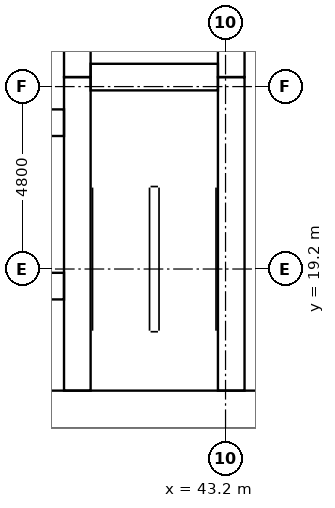
"""IFC4 building model, lengths in metres.
Left out: names, types, materials, properties, quantities, classifications, styles, units other than length and angle.
Written with IfcOpenShell. Run it as: python <this file> out.ifc"""

import sys

from ifc_helpers import new_model, si_unit, direction, frame, frame_2d, origin, place, context, subcontext, project, spatial, rectangle, extrude, element, fill, save


model = new_model("IFC4")
c1 = context("Model", 3, precision=1e-05, world=origin(), true_north=direction((0.0, 1.0)))
c2 = subcontext(c1, "Body", "Model", "MODEL_VIEW")
j1 = project(units=[si_unit("LENGTHUNIT", "METRE"), si_unit("PLANEANGLEUNIT", "RADIAN")], contexts=[c1])
p1 = place(None, origin())
s1 = spatial("IfcSite", under=j1, at=p1, CompositionType="ELEMENT")
p2 = place(p1, origin())
s2 = spatial("IfcBuilding", under=s1, at=p2, CompositionType="ELEMENT")
p3 = place(p2, frame((0.0, 0.0, 10.5)))
s3 = spatial("IfcBuildingStorey", under=s2, at=p3, CompositionType="ELEMENT", Elevation=10.5)
p4 = place(p3, frame((15.0, 15.5, 0.0), z_axis=(0.0, 0.0, 1.0), x_axis=(1.0, 0.0, 0.0)))
e1 = element("IfcWall", 1, at=p4, inside=s3, PredefinedType="SHEAR", context=c2, shape_type="SweptSolid", body=[
    extrude(rectangle(XDim=32.4, YDim=1.0, at=frame_2d((16.2, 0.0))), origin(), (0.0, 0.0, 1.0), 4.2),
])
p5 = place(p4, frame((15.3, 0.0, 0.0)))
e2 = element("IfcOpeningElement", 2, at=p5, cuts=e1, PredefinedType="OPENING", context=c2, shape_type="SweptSolid", body=[
    extrude(rectangle(XDim=1.8, YDim=2.1, at=frame_2d((0.9, 1.05))), frame((0.0, 0.51, 0.0), z_axis=(0.0, -1.0, 0.0), x_axis=(1.0, 0.0, 0.0)), (0.0, 0.0, 1.0), 1.02),
])
p6 = place(p3, frame((39.3, 16.0, 0.0), z_axis=(0.0, 0.0, 1.0), x_axis=(0.0, 1.0, 0.0)))
e3 = element("IfcWall", 3, at=p6, inside=s3, PredefinedType="SHEAR", context=c2, shape_type="SweptSolid", body=[
    extrude(rectangle(XDim=8.25, YDim=0.7, at=frame_2d((4.125, 0.0))), origin(), (0.0, 0.0, 1.0), 4.2),
])
p7 = place(p3, frame((39.3, 24.25, 0.0), z_axis=(0.0, 0.0, 1.0), x_axis=(0.0, 1.0, 0.0)))
e4 = element("IfcWall", 4, at=p7, inside=s3, PredefinedType="SHEAR", context=c2, shape_type="SweptSolid", body=[
    extrude(rectangle(XDim=3.5, YDim=0.7, at=frame_2d((1.75, 0.0))), origin(), (0.0, 0.0, 1.0), 4.2),
])
p8 = place(p3, frame((43.35, 16.0, 0.0), z_axis=(0.0, 0.0, 1.0), x_axis=(0.0, 1.0, 0.0)))
e5 = element("IfcWall", 5, at=p8, inside=s3, PredefinedType="SHEAR", context=c2, shape_type="SweptSolid", body=[
    extrude(rectangle(XDim=8.25, YDim=0.7, at=frame_2d((4.125, 0.0))), origin(), (0.0, 0.0, 1.0), 4.2),
])
p9 = place(p8, frame((0.2, 0.0, 0.0)))
e6 = element("IfcOpeningElement", 6, at=p9, cuts=e5, PredefinedType="OPENING", context=c2, shape_type="SweptSolid", body=[
    extrude(rectangle(XDim=1.2, YDim=2.1, at=frame_2d((0.6, 1.05))), frame((0.0, 0.36, 0.0), z_axis=(0.0, -1.0, 0.0), x_axis=(1.0, 0.0, 0.0)), (0.0, 0.0, 1.0), 0.72),
])
p10 = place(p3, frame((43.35, 24.25, 0.0), z_axis=(0.0, 0.0, 1.0), x_axis=(0.0, 1.0, 0.0)))
e7 = element("IfcWall", 7, at=p10, inside=s3, PredefinedType="SHEAR", context=c2, shape_type="SweptSolid", body=[
    extrude(rectangle(XDim=3.5, YDim=0.7, at=frame_2d((1.75, 0.0))), origin(), (0.0, 0.0, 1.0), 4.2),
])
p11 = place(p10, frame((1.2, 0.0, 0.0)))
e8 = element("IfcOpeningElement", 8, at=p11, cuts=e7, PredefinedType="OPENING", context=c2, shape_type="SweptSolid", body=[
    extrude(rectangle(XDim=1.1, YDim=2.1, at=frame_2d((0.55, 1.05))), frame((0.0, 0.36, 0.0), z_axis=(0.0, -1.0, 0.0), x_axis=(1.0, 0.0, 0.0)), (0.0, 0.0, 1.0), 0.72),
])
p12 = place(p3, frame((39.65, 24.25, 0.0), z_axis=(0.0, 0.0, 1.0), x_axis=(1.0, 0.0, 0.0)))
e9 = element("IfcWall", 9, at=p12, inside=s3, PredefinedType="SHEAR", context=c2, shape_type="SweptSolid", body=[
    extrude(rectangle(XDim=3.35, YDim=0.7, at=frame_2d((1.675, 0.0))), origin(), (0.0, 0.0, 1.0), 4.2),
])
p13 = place(p3, frame((33.35, 18.75, 0.0), z_axis=(0.0, 0.0, 1.0), x_axis=(1.0, 0.0, 0.0)))
e10 = element("IfcWall", 10, at=p13, inside=s3, PredefinedType="SHEAR", context=c2, shape_type="SweptSolid", body=[
    extrude(rectangle(XDim=5.6, YDim=0.7, at=frame_2d((2.8, 0.0))), origin(), (0.0, 0.0, 1.0), 4.2),
])
p14 = place(p13, frame((1.325, 0.0, 0.0)))
e11 = element("IfcOpeningElement", 11, at=p14, cuts=e10, PredefinedType="OPENING", context=c2, shape_type="SweptSolid", body=[
    extrude(rectangle(XDim=1.1, YDim=2.1, at=frame_2d((0.55, 1.05))), frame((0.0, 0.36, 0.0), z_axis=(0.0, -1.0, 0.0), x_axis=(1.0, 0.0, 0.0)), (0.0, 0.0, 1.0), 0.72),
])
p15 = place(p13, frame((3.875, 0.0, 0.0)))
e12 = element("IfcOpeningElement", 12, at=p15, cuts=e10, PredefinedType="OPENING", context=c2, shape_type="SweptSolid", body=[
    extrude(rectangle(XDim=1.1, YDim=2.1, at=frame_2d((0.55, 1.05))), frame((0.0, 0.36, 0.0), z_axis=(0.0, -1.0, 0.0), x_axis=(1.0, 0.0, 0.0)), (0.0, 0.0, 1.0), 0.72),
])
p16 = place(p3, frame((23.45, 23.05, 0.0), z_axis=(0.0, 0.0, 1.0), x_axis=(1.0, 0.0, 0.0)))
e13 = element("IfcWall", 13, at=p16, inside=s3, PredefinedType="SHEAR", context=c2, shape_type="SweptSolid", body=[
    extrude(rectangle(XDim=15.5, YDim=0.7, at=frame_2d((7.75, 0.0))), origin(), (0.0, 0.0, 1.0), 4.2),
])
p17 = place(p16, frame((0.658, 0.0, 0.0)))
e14 = element("IfcOpeningElement", 14, at=p17, cuts=e13, PredefinedType="OPENING", context=c2, shape_type="SweptSolid", body=[
    extrude(rectangle(XDim=1.1, YDim=2.1, at=frame_2d((0.55, 1.05))), frame((0.0, 0.36, 0.0), z_axis=(0.0, -1.0, 0.0), x_axis=(1.0, 0.0, 0.0)), (0.0, 0.0, 1.0), 0.72),
])
p18 = place(p16, frame((3.275, 0.0, 0.0)))
e15 = element("IfcOpeningElement", 15, at=p18, cuts=e13, PredefinedType="OPENING", context=c2, shape_type="SweptSolid", body=[
    extrude(rectangle(XDim=1.1, YDim=2.1, at=frame_2d((0.55, 1.05))), frame((0.0, 0.36, 0.0), z_axis=(0.0, -1.0, 0.0), x_axis=(1.0, 0.0, 0.0)), (0.0, 0.0, 1.0), 0.72),
])
p19 = place(p16, frame((11.628, 0.0, 0.0)))
e16 = element("IfcOpeningElement", 16, at=p19, cuts=e13, PredefinedType="OPENING", context=c2, shape_type="SweptSolid", body=[
    extrude(rectangle(XDim=1.0, YDim=2.1, at=frame_2d((0.5, 1.05))), frame((0.0, 0.36, 0.0), z_axis=(0.0, -1.0, 0.0), x_axis=(1.0, 0.0, 0.0)), (0.0, 0.0, 1.0), 0.72),
])
p20 = place(p16, frame((14.245, 0.0, 0.0)))
e17 = element("IfcOpeningElement", 17, at=p20, cuts=e13, PredefinedType="OPENING", context=c2, shape_type="SweptSolid", body=[
    extrude(rectangle(XDim=1.0, YDim=2.1, at=frame_2d((0.5, 1.05))), frame((0.0, 0.36, 0.0), z_axis=(0.0, -1.0, 0.0), x_axis=(1.0, 0.0, 0.0)), (0.0, 0.0, 1.0), 0.72),
])
p21 = place(p9, origin())
e18 = element("IfcDoor", 18, at=p21, inside=s3, OperationType="SINGLE_SWING_LEFT", PredefinedType="DOOR", context=c2, shape_type="SweptSolid", body=[
    extrude(rectangle(XDim=1.2, YDim=2.1, at=frame_2d((0.6, 1.05))), frame((0.0, 0.025, 0.0), z_axis=(0.0, -1.0, 0.0), x_axis=(1.0, 0.0, 0.0)), (0.0, 0.0, 1.0), 0.05),
])
fill(e6, e18)
p22 = place(p20, frame((1.0, 0.0, 0.0), z_axis=(0.0, 0.0, 1.0), x_axis=(-1.0, 0.0, 0.0)))
e19 = element("IfcDoor", 19, at=p22, inside=s3, OperationType="SINGLE_SWING_RIGHT", PredefinedType="DOOR", context=c2, shape_type="SweptSolid", body=[
    extrude(rectangle(XDim=1.0, YDim=2.1, at=frame_2d((0.5, 1.05))), frame((0.0, 0.025, 0.0), z_axis=(0.0, -1.0, 0.0), x_axis=(1.0, 0.0, 0.0)), (0.0, 0.0, 1.0), 0.05),
])
fill(e17, e19)
save(model, sys.argv[1])
